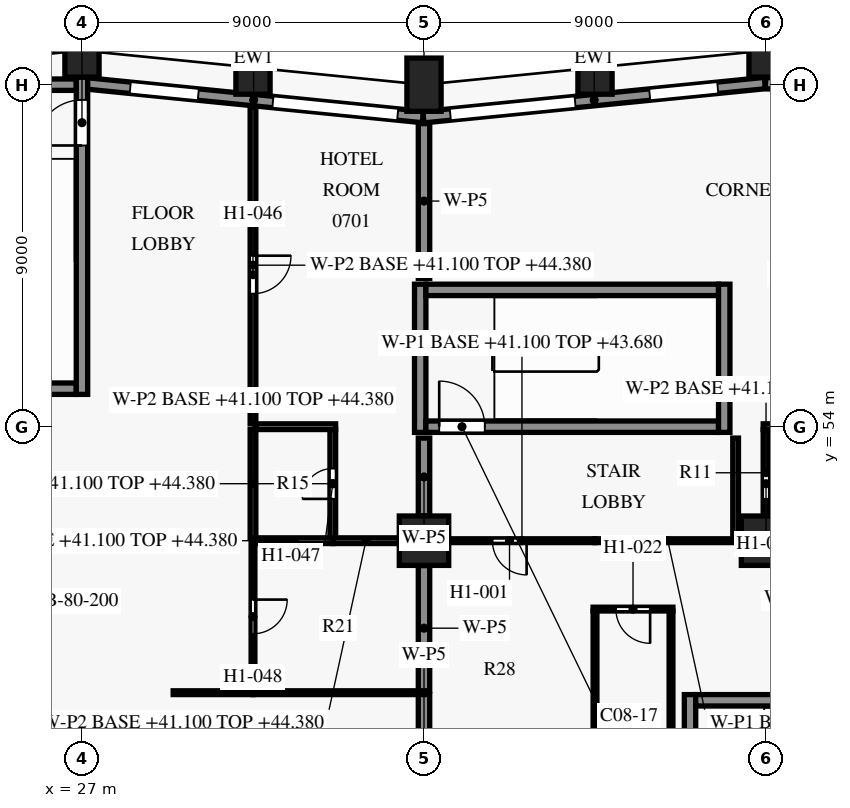
"""IFC4 building model, lengths in metres.
Left out: names, types, materials, properties, quantities, classifications, styles, units other than length and angle.
Written with IfcOpenShell. Run it as: python <this file> out.ifc"""

import sys

from ifc_helpers import new_model, si_unit, direction, frame, frame_2d, origin, origin_2d, place, context, subcontext, project, spatial, rectangle, extrude, element, fill, save


model = new_model("IFC4")
c1 = context("Model", 3, precision=1e-05, world=origin(), true_north=direction((0.0, 1.0)))
c2 = subcontext(c1, "Body", "Model", "MODEL_VIEW")
j1 = project(units=[si_unit("LENGTHUNIT", "METRE"), si_unit("PLANEANGLEUNIT", "RADIAN")], contexts=[c1])
p1 = place(None, origin())
s1 = spatial("IfcSite", under=j1, at=p1, CompositionType="ELEMENT")
p2 = place(p1, origin())
s2 = spatial("IfcBuilding", under=s1, at=p2, CompositionType="ELEMENT")
p3 = place(p2, frame((0.0, 0.0, 41.1)))
s3 = spatial("IfcBuildingStorey", under=s2, at=p3, CompositionType="ELEMENT", Elevation=41.1)
for number, where, z_axis, x_axis in (
    (1, (45.0, 63.9, 0.0), (0.0, 0.0, 1.0), (-1.0, 0.0, 0.0)),
    (2, (40.5, 63.45, 0.0), (0.0, 0.0, 1.0), (-0.995, -0.1, 0.0)),
    (3, (36.0, 63.0, 0.0), (0.0, 0.0, 1.0), (-1.0, 0.0, 0.0)),
    (4, (31.5, 63.45, 0.0), (0.0, 0.0, 1.0), (-0.995, 0.1, 0.0)),
    (5, (27.0, 63.9, 0.0), (0.0, 0.0, 1.0), (-1.0, 0.0, 0.0)),
):
    element("IfcColumn", number, at=place(p3, frame(where, z_axis=z_axis, x_axis=x_axis)), inside=s3, PredefinedType="COLUMN", context=c2, shape_type="SweptSolid", body=[
        extrude(rectangle(XDim=0.9, YDim=1.4, at=origin_2d()), origin(), (0.0, 0.0, 1.0), 3.6),
    ])
for number, where, z_axis, x_axis in (
    (6, (36.0, 51.0, 0.0), (0.0, 0.0, 1.0), (1.0, 0.0, 0.0)),
    (7, (45.0, 51.0, 0.0), (0.0, 0.0, 1.0), (1.0, 0.0, 0.0)),
):
    element("IfcColumn", number, at=place(p3, frame(where, z_axis=z_axis, x_axis=x_axis)), inside=s3, PredefinedType="COLUMN", context=c2, shape_type="SweptSolid", body=[
        extrude(rectangle(XDim=1.3, YDim=1.3, at=origin_2d()), origin(), (0.0, 0.0, 1.0), 3.6),
    ])
p4 = place(p3, frame((44.985, 63.047, 0.0), z_axis=(0.0, 0.0, 1.0), x_axis=(0.995035316196, -0.099522457379, 0.0)))
e8 = element("IfcWall", 8, at=p4, inside=s3, PredefinedType="SOLIDWALL", context=c2, shape_type="SweptSolid", body=[
    extrude(rectangle(XDim=9.03, YDim=0.3, at=frame_2d((4.515, 0.0))), origin(), (0.0, 0.0, 1.0), 2.95),
])
p5 = place(p4, frame((1.291, 0.0, 0.75)))
e9 = element("IfcOpeningElement", 9, at=p5, cuts=e8, PredefinedType="OPENING", context=c2, shape_type="SweptSolid", body=[
    extrude(rectangle(XDim=1.8, YDim=1.8, at=frame_2d((0.9, 0.9))), frame((0.0, 0.16, 0.0), z_axis=(0.0, -1.0, 0.0), x_axis=(1.0, 0.0, 0.0)), (0.0, 0.0, 1.0), 0.32),
])
p6 = place(p4, frame((5.064, 0.0, 0.15)))
e10 = element("IfcOpeningElement", 10, at=p6, cuts=e8, PredefinedType="OPENING", context=c2, shape_type="SweptSolid", body=[
    extrude(rectangle(XDim=3.3, YDim=2.4, at=frame_2d((1.65, 1.2))), frame((0.0, 0.16, 0.0), z_axis=(0.0, -1.0, 0.0), x_axis=(1.0, 0.0, 0.0)), (0.0, 0.0, 1.0), 0.32),
])
p7 = place(p3, frame((35.985, 62.144, 0.0), z_axis=(0.0, 0.0, 1.0), x_axis=(0.995037993253, 0.099495688264, 0.0)))
e11 = element("IfcWall", 11, at=p7, inside=s3, PredefinedType="SOLIDWALL", context=c2, shape_type="SweptSolid", body=[
    extrude(rectangle(XDim=9.03, YDim=0.3, at=frame_2d((4.515, 0.0))), origin(), (0.0, 0.0, 1.0), 2.95),
])
p8 = place(p7, frame((0.711, 0.0, 0.15)))
e12 = element("IfcOpeningElement", 12, at=p8, cuts=e11, PredefinedType="OPENING", context=c2, shape_type="SweptSolid", body=[
    extrude(rectangle(XDim=3.3, YDim=2.4, at=frame_2d((1.65, 1.2))), frame((0.0, 0.16, 0.0), z_axis=(0.0, -1.0, 0.0), x_axis=(1.0, 0.0, 0.0)), (0.0, 0.0, 1.0), 0.32),
])
p9 = place(p7, frame((5.984, 0.0, 0.75)))
e13 = element("IfcOpeningElement", 13, at=p9, cuts=e11, PredefinedType="OPENING", context=c2, shape_type="SweptSolid", body=[
    extrude(rectangle(XDim=1.8, YDim=1.8, at=frame_2d((0.9, 0.9))), frame((0.0, 0.16, 0.0), z_axis=(0.0, -1.0, 0.0), x_axis=(1.0, 0.0, 0.0)), (0.0, 0.0, 1.0), 0.32),
])
p10 = place(p3, frame((27.065, 63.039, 0.0), z_axis=(0.0, 0.0, 1.0), x_axis=(0.995036379926, -0.099511821531, 0.0)))
e14 = element("IfcWall", 14, at=p10, inside=s3, PredefinedType="SOLIDWALL", context=c2, shape_type="SweptSolid", body=[
    extrude(rectangle(XDim=8.95, YDim=0.3, at=frame_2d((4.475, 0.0))), origin(), (0.0, 0.0, 1.0), 2.95),
])
p11 = place(p10, frame((1.211, 0.0, 0.75)))
e15 = element("IfcOpeningElement", 15, at=p11, cuts=e14, PredefinedType="OPENING", context=c2, shape_type="SweptSolid", body=[
    extrude(rectangle(XDim=1.8, YDim=1.8, at=frame_2d((0.9, 0.9))), frame((0.0, 0.16, 0.0), z_axis=(0.0, -1.0, 0.0), x_axis=(1.0, 0.0, 0.0)), (0.0, 0.0, 1.0), 0.32),
])
p12 = place(p10, frame((4.984, 0.0, 0.15)))
e16 = element("IfcOpeningElement", 16, at=p12, cuts=e14, PredefinedType="OPENING", context=c2, shape_type="SweptSolid", body=[
    extrude(rectangle(XDim=3.3, YDim=2.4, at=frame_2d((1.65, 1.2))), frame((0.0, 0.16, 0.0), z_axis=(0.0, -1.0, 0.0), x_axis=(1.0, 0.0, 0.0)), (0.0, 0.0, 1.0), 0.32),
])
p13 = place(p3, frame((43.15, 46.8, 0.0), z_axis=(0.0, 0.0, 1.0), x_axis=(1.0, 0.0, 0.0)))
e17 = element("IfcWall", 17, at=p13, inside=s3, PredefinedType="SHEAR", context=c2, shape_type="SweptSolid", body=[
    extrude(rectangle(XDim=7.7, YDim=0.3, at=frame_2d((3.85, 0.0))), origin(), (0.0, 0.0, 1.0), 3.3),
])
p14 = place(p3, frame((36.05, 54.0, 0.0), z_axis=(0.0, 0.0, 1.0), x_axis=(1.0, 0.0, 0.0)))
e18 = element("IfcWall", 18, at=p14, inside=s3, PredefinedType="SHEAR", context=c2, shape_type="SweptSolid", body=[
    extrude(rectangle(XDim=7.7, YDim=0.3, at=frame_2d((3.85, 0.0))), origin(), (0.0, 0.0, 1.0), 3.3),
])
p15 = place(p14, frame((0.35, 0.0, 0.0)))
e19 = element("IfcOpeningElement", 19, at=p15, cuts=e18, PredefinedType="OPENING", context=c2, shape_type="SweptSolid", body=[
    extrude(rectangle(XDim=1.2, YDim=2.2, at=frame_2d((0.6, 1.1))), frame((0.0, 0.16, 0.0), z_axis=(0.0, -1.0, 0.0), x_axis=(1.0, 0.0, 0.0)), (0.0, 0.0, 1.0), 0.32),
])
p16 = place(p3, frame((23.4, 55.0, 0.0), z_axis=(0.0, 0.0, 1.0), x_axis=(1.0, 0.0, 0.0)))
e20 = element("IfcWall", 20, at=p16, inside=s3, PredefinedType="SHEAR", context=c2, shape_type="SweptSolid", body=[
    extrude(rectangle(XDim=3.45, YDim=0.3, at=frame_2d((1.725, 0.0))), origin(), (0.0, 0.0, 1.0), 3.3),
])
p17 = place(p3, frame((36.05, 57.6, 0.0), z_axis=(0.0, 0.0, 1.0), x_axis=(1.0, 0.0, 0.0)))
e21 = element("IfcWall", 21, at=p17, inside=s3, PredefinedType="SHEAR", context=c2, shape_type="SweptSolid", body=[
    extrude(rectangle(XDim=7.7, YDim=0.3, at=frame_2d((3.85, 0.0))), origin(), (0.0, 0.0, 1.0), 3.3),
])
p18 = place(p3, frame((23.55, 63.0, 0.0), z_axis=(0.0, 0.0, 1.0), x_axis=(1.0, 0.0, 0.0)))
e22 = element("IfcWall", 22, at=p18, inside=s3, PredefinedType="SHEAR", context=c2, shape_type="SweptSolid", body=[
    extrude(rectangle(XDim=3.3, YDim=0.3, at=frame_2d((1.65, 0.0))), origin(), (0.0, 0.0, 1.0), 3.3),
])
p19 = place(p3, frame((27.0, 54.85, 0.0), z_axis=(0.0, 0.0, 1.0), x_axis=(0.0, 1.0, 0.0)))
e23 = element("IfcWall", 23, at=p19, inside=s3, PredefinedType="SHEAR", context=c2, shape_type="SweptSolid", body=[
    extrude(rectangle(XDim=8.35, YDim=0.3, at=frame_2d((4.175, 0.0))), origin(), (0.0, 0.0, 1.0), 3.3),
])
p20 = place(p19, frame((6.55, 0.0, 0.0)))
e24 = element("IfcOpeningElement", 24, at=p20, cuts=e23, PredefinedType="OPENING", context=c2, shape_type="SweptSolid", body=[
    extrude(rectangle(XDim=1.2, YDim=2.2, at=frame_2d((0.6, 1.1))), frame((0.0, 0.16, 0.0), z_axis=(0.0, -1.0, 0.0), x_axis=(1.0, 0.0, 0.0)), (0.0, 0.0, 1.0), 0.32),
])
for number, where, z_axis, x_axis in (
    (25, (35.9, 53.85, 0.0), (0.0, 0.0, 1.0), (0.0, 1.0, 0.0)),
    (26, (43.0, 43.05, 0.0), (0.0, 0.0, 1.0), (0.0, 1.0, 0.0)),
    (27, (43.9, 53.85, 0.0), (0.0, 0.0, 1.0), (0.0, 1.0, 0.0)),
):
    element("IfcWall", number, at=place(p3, frame(where, z_axis=z_axis, x_axis=x_axis)), inside=s3, PredefinedType="SHEAR", context=c2, shape_type="SweptSolid", body=[
        extrude(rectangle(XDim=3.9, YDim=0.3, at=frame_2d((1.95, 0.0))), origin(), (0.0, 0.0, 1.0), 3.3),
    ])
p21 = place(p3, frame((36.0, 46.95, 0.0), z_axis=(0.0, 0.0, 1.0), x_axis=(0.0, -1.0, 0.0)))
e28 = element("IfcWall", 28, at=p21, inside=s3, PredefinedType="PARTITIONING", context=c2, shape_type="SweptSolid", body=[
    extrude(rectangle(XDim=3.7, YDim=0.3, at=frame_2d((1.85, 0.0))), origin(), (0.0, 0.0, 1.0), 2.58),
])
p22 = place(p21, frame((0.95, 0.0, 0.0)))
e29 = element("IfcOpeningElement", 29, at=p22, cuts=e28, PredefinedType="OPENING", context=c2, shape_type="SweptSolid", body=[
    extrude(rectangle(XDim=1.8, YDim=2.1, at=frame_2d((0.9, 1.05))), frame((0.0, 0.16, 0.0), z_axis=(0.0, -1.0, 0.0), x_axis=(1.0, 0.0, 0.0)), (0.0, 0.0, 1.0), 0.32),
])
p23 = place(p3, frame((29.4, 47.0, 0.0), z_axis=(0.0, 0.0, 1.0), x_axis=(1.0, 0.0, 0.0)))
e30 = element("IfcWall", 30, at=p23, inside=s3, PredefinedType="PARTITIONING", context=c2, shape_type="SweptSolid", body=[
    extrude(rectangle(XDim=2.1, YDim=0.1, at=frame_2d((1.05, 0.0))), origin(), (0.0, 0.0, 1.0), 3.28),
])
p24 = place(p3, frame((31.5, 47.0, 0.0), z_axis=(0.0, 0.0, 1.0), x_axis=(1.0, 0.0, 0.0)))
e31 = element("IfcWall", 31, at=p24, inside=s3, PredefinedType="PARTITIONING", context=c2, shape_type="SweptSolid", body=[
    extrude(rectangle(XDim=4.35, YDim=0.1, at=frame_2d((2.175, 0.0))), origin(), (0.0, 0.0, 1.0), 3.28),
])
for number, where, z_axis, x_axis in (
    (32, (40.5, 49.15, 0.0), (0.0, 0.0, 1.0), (0.0, -1.0, 0.0)),
    (33, (42.5, 49.15, 0.0), (0.0, 0.0, 1.0), (0.0, -1.0, 0.0)),
):
    element("IfcWall", number, at=place(p3, frame(where, z_axis=z_axis, x_axis=x_axis)), inside=s3, PredefinedType="PARTITIONING", context=c2, shape_type="SweptSolid", body=[
        extrude(rectangle(XDim=8.3, YDim=0.1, at=frame_2d((4.15, 0.0))), origin(), (0.0, 0.0, 1.0), 3.28),
    ])
p25 = place(p3, frame((42.55, 49.2, 0.0), z_axis=(0.0, 0.0, 1.0), x_axis=(-1.0, 0.0, 0.0)))
e34 = element("IfcWall", 34, at=p25, inside=s3, PredefinedType="PARTITIONING", context=c2, shape_type="SweptSolid", body=[
    extrude(rectangle(XDim=2.1, YDim=0.1, at=frame_2d((1.05, 0.0))), origin(), (0.0, 0.0, 1.0), 3.28),
])
p26 = place(p25, frame((0.6, 0.0, 0.0)))
e35 = element("IfcOpeningElement", 35, at=p26, cuts=e34, PredefinedType="OPENING", context=c2, shape_type="SweptSolid", body=[
    extrude(rectangle(XDim=0.9, YDim=2.1, at=frame_2d((0.45, 1.05))), frame((0.0, 0.06, 0.0), z_axis=(0.0, -1.0, 0.0), x_axis=(1.0, 0.0, 0.0)), (0.0, 0.0, 1.0), 0.12),
])
p27 = place(p3, frame((36.0, 50.345, 0.0), z_axis=(0.0, 0.0, 1.0), x_axis=(0.0, -1.0, 0.0)))
e36 = element("IfcWall", 36, at=p27, inside=s3, PredefinedType="PARTITIONING", context=c2, shape_type="SweptSolid", body=[
    extrude(rectangle(XDim=3.295, YDim=0.3, at=frame_2d((1.647, 0.0))), origin(), (0.0, 0.0, 1.0), 2.58),
])
p28 = place(p3, frame((31.5, 50.925, 0.0), z_axis=(0.0, 0.0, 1.0), x_axis=(0.0, -1.0, 0.0)))
e37 = element("IfcWall", 37, at=p28, inside=s3, PredefinedType="PARTITIONING", context=c2, shape_type="SweptSolid", body=[
    extrude(rectangle(XDim=3.875, YDim=0.1, at=frame_2d((1.938, 0.0))), origin(), (0.0, 0.0, 1.0), 3.28),
])
p29 = place(p28, frame((1.475, 0.0, 0.0)))
e38 = element("IfcOpeningElement", 38, at=p29, cuts=e37, PredefinedType="OPENING", context=c2, shape_type="SweptSolid", body=[
    extrude(rectangle(XDim=0.9, YDim=2.1, at=frame_2d((0.45, 1.05))), frame((0.0, 0.06, 0.0), z_axis=(0.0, -1.0, 0.0), x_axis=(1.0, 0.0, 0.0)), (0.0, 0.0, 1.0), 0.12),
])
p30 = place(p3, frame((31.575, 51.0, 0.0), z_axis=(0.0, 0.0, 1.0), x_axis=(1.0, 0.0, 0.0)))
e39 = element("IfcWall", 39, at=p30, inside=s3, PredefinedType="PARTITIONING", context=c2, shape_type="SweptSolid", body=[
    extrude(rectangle(XDim=2.025, YDim=0.15, at=frame_2d((1.013, 0.0))), origin(), (0.0, 0.0, 1.0), 3.28),
])
p31 = place(p3, frame((33.6, 51.0, 0.0), z_axis=(0.0, 0.0, 1.0), x_axis=(1.0, 0.0, 0.0)))
e40 = element("IfcWall", 40, at=p31, inside=s3, PredefinedType="PARTITIONING", context=c2, shape_type="SweptSolid", body=[
    extrude(rectangle(XDim=1.745, YDim=0.15, at=frame_2d((0.873, 0.0))), origin(), (0.0, 0.0, 1.0), 3.28),
])
p32 = place(p3, frame((40.5, 51.0, 0.0), z_axis=(0.0, 0.0, 1.0), x_axis=(-1.0, 0.0, 0.0)))
e41 = element("IfcWall", 41, at=p32, inside=s3, PredefinedType="PARTITIONING", context=c2, shape_type="SweptSolid", body=[
    extrude(rectangle(XDim=3.845, YDim=0.1, at=frame_2d((1.922, 0.0))), origin(), (0.0, 0.0, 1.0), 2.58),
])
p33 = place(p32, frame((1.8, 0.0, 0.0)))
e42 = element("IfcOpeningElement", 42, at=p33, cuts=e41, PredefinedType="OPENING", context=c2, shape_type="SweptSolid", body=[
    extrude(rectangle(XDim=0.9, YDim=2.1, at=frame_2d((0.45, 1.05))), frame((0.0, 0.06, 0.0), z_axis=(0.0, -1.0, 0.0), x_axis=(1.0, 0.0, 0.0)), (0.0, 0.0, 1.0), 0.12),
])
p34 = place(p3, frame((44.33, 51.0, 0.0), z_axis=(0.0, 0.0, 1.0), x_axis=(-1.0, 0.0, 0.0)))
e43 = element("IfcWall", 43, at=p34, inside=s3, PredefinedType="PARTITIONING", context=c2, shape_type="SweptSolid", body=[
    extrude(rectangle(XDim=3.83, YDim=0.1, at=frame_2d((1.915, 0.0))), origin(), (0.0, 0.0, 1.0), 2.58),
])
p35 = place(p3, frame((33.6, 51.075, 0.0), z_axis=(0.0, 0.0, 1.0), x_axis=(0.0, 1.0, 0.0)))
e44 = element("IfcWall", 44, at=p35, inside=s3, PredefinedType="PARTITIONING", context=c2, shape_type="SweptSolid", body=[
    extrude(rectangle(XDim=2.85, YDim=0.15, at=frame_2d((1.425, 0.0))), origin(), (0.0, 0.0, 1.0), 3.28),
])
p36 = place(p35, frame((1.025, 0.0, 0.0)))
e45 = element("IfcOpeningElement", 45, at=p36, cuts=e44, PredefinedType="OPENING", context=c2, shape_type="SweptSolid", body=[
    extrude(rectangle(XDim=0.8, YDim=2.1, at=frame_2d((0.4, 1.05))), frame((0.0, 0.085, 0.0), z_axis=(0.0, -1.0, 0.0), x_axis=(1.0, 0.0, 0.0)), (0.0, 0.0, 1.0), 0.17),
])
p37 = place(p3, frame((36.0, 53.7, 0.0), z_axis=(0.0, 0.0, 1.0), x_axis=(0.0, -1.0, 0.0)))
e46 = element("IfcWall", 46, at=p37, inside=s3, PredefinedType="PARTITIONING", context=c2, shape_type="SweptSolid", body=[
    extrude(rectangle(XDim=2.045, YDim=0.3, at=frame_2d((1.022, 0.0))), origin(), (0.0, 0.0, 1.0), 2.58),
])
p38 = place(p3, frame((44.2, 53.7, 0.0), z_axis=(0.0, 0.0, 1.0), x_axis=(0.0, -1.0, 0.0)))
e47 = element("IfcWall", 47, at=p38, inside=s3, PredefinedType="PARTITIONING", context=c2, shape_type="SweptSolid", body=[
    extrude(rectangle(XDim=2.625, YDim=0.15, at=frame_2d((1.312, 0.0))), origin(), (0.0, 0.0, 1.0), 2.58),
])
p39 = place(p3, frame((31.5, 53.925, 0.0), z_axis=(0.0, 0.0, 1.0), x_axis=(0.0, -1.0, 0.0)))
e48 = element("IfcWall", 48, at=p39, inside=s3, PredefinedType="PARTITIONING", context=c2, shape_type="SweptSolid", body=[
    extrude(rectangle(XDim=2.85, YDim=0.15, at=frame_2d((1.425, 0.0))), origin(), (0.0, 0.0, 1.0), 3.28),
])
p40 = place(p3, frame((45.0, 53.925, 0.0), z_axis=(0.0, 0.0, 1.0), x_axis=(0.0, -1.0, 0.0)))
e49 = element("IfcWall", 49, at=p40, inside=s3, PredefinedType="PARTITIONING", context=c2, shape_type="SweptSolid", body=[
    extrude(rectangle(XDim=2.27, YDim=0.15, at=frame_2d((1.135, 0.0))), origin(), (0.0, 0.0, 1.0), 2.73),
])
p41 = place(p40, frame((1.025, 0.0, 0.0)))
e50 = element("IfcOpeningElement", 50, at=p41, cuts=e49, PredefinedType="OPENING", context=c2, shape_type="SweptSolid", body=[
    extrude(rectangle(XDim=0.8, YDim=2.1, at=frame_2d((0.4, 1.05))), frame((0.0, 0.085, 0.0), z_axis=(0.0, -1.0, 0.0), x_axis=(1.0, 0.0, 0.0)), (0.0, 0.0, 1.0), 0.17),
])
p42 = place(p3, frame((33.675, 54.0, 0.0), z_axis=(0.0, 0.0, 1.0), x_axis=(-1.0, 0.0, 0.0)))
e51 = element("IfcWall", 51, at=p42, inside=s3, PredefinedType="PARTITIONING", context=c2, shape_type="SweptSolid", body=[
    extrude(rectangle(XDim=2.1, YDim=0.15, at=frame_2d((1.05, 0.0))), origin(), (0.0, 0.0, 1.0), 3.28),
])
p43 = place(p3, frame((47.175, 54.0, 0.0), z_axis=(0.0, 0.0, 1.0), x_axis=(-1.0, 0.0, 0.0)))
e52 = element("IfcWall", 52, at=p43, inside=s3, PredefinedType="PARTITIONING", context=c2, shape_type="SweptSolid", body=[
    extrude(rectangle(XDim=2.25, YDim=0.15, at=frame_2d((1.125, 0.0))), origin(), (0.0, 0.0, 1.0), 2.73),
])
p44 = place(p3, frame((36.0, 61.975, 0.0), z_axis=(0.0, 0.0, 1.0), x_axis=(0.0, -1.0, 0.0)))
e53 = element("IfcWall", 53, at=p44, inside=s3, PredefinedType="PARTITIONING", context=c2, shape_type="SweptSolid", body=[
    extrude(rectangle(XDim=4.075, YDim=0.3, at=frame_2d((2.038, 0.0))), origin(), (0.0, 0.0, 1.0), 2.58),
])
p45 = place(p3, frame((31.5, 62.425, 0.0), z_axis=(0.0, 0.0, 1.0), x_axis=(0.0, -1.0, 0.0)))
e54 = element("IfcWall", 54, at=p45, inside=s3, PredefinedType="PARTITIONING", context=c2, shape_type="SweptSolid", body=[
    extrude(rectangle(XDim=8.35, YDim=0.15, at=frame_2d((4.175, 0.0))), origin(), (0.0, 0.0, 1.0), 3.28),
])
p46 = place(p45, frame((3.925, 0.0, 0.0)))
e55 = element("IfcOpeningElement", 55, at=p46, cuts=e54, PredefinedType="OPENING", context=c2, shape_type="SweptSolid", body=[
    extrude(rectangle(XDim=1.0, YDim=2.1, at=frame_2d((0.5, 1.05))), frame((0.0, 0.085, 0.0), z_axis=(0.0, -1.0, 0.0), x_axis=(1.0, 0.0, 0.0)), (0.0, 0.0, 1.0), 0.17),
])
p47 = place(p8, origin())
e56 = element("IfcWindow", 56, at=p47, inside=s3, PartitioningType="SINGLE_PANEL", PredefinedType="WINDOW", context=c2, shape_type="SweptSolid", body=[
    extrude(rectangle(XDim=3.3, YDim=2.4, at=frame_2d((1.65, 1.2))), frame((0.0, 0.03, 0.0), z_axis=(0.0, -1.0, 0.0), x_axis=(1.0, 0.0, 0.0)), (0.0, 0.0, 1.0), 0.06),
])
fill(e12, e56)
p48 = place(p9, origin())
e57 = element("IfcWindow", 57, at=p48, inside=s3, PartitioningType="SINGLE_PANEL", PredefinedType="WINDOW", context=c2, shape_type="SweptSolid", body=[
    extrude(rectangle(XDim=1.8, YDim=1.8, at=frame_2d((0.9, 0.9))), frame((0.0, 0.03, 0.0), z_axis=(0.0, -1.0, 0.0), x_axis=(1.0, 0.0, 0.0)), (0.0, 0.0, 1.0), 0.06),
])
fill(e13, e57)
p49 = place(p11, origin())
e58 = element("IfcWindow", 58, at=p49, inside=s3, PartitioningType="SINGLE_PANEL", PredefinedType="WINDOW", context=c2, shape_type="SweptSolid", body=[
    extrude(rectangle(XDim=1.8, YDim=1.8, at=frame_2d((0.9, 0.9))), frame((0.0, 0.03, 0.0), z_axis=(0.0, -1.0, 0.0), x_axis=(1.0, 0.0, 0.0)), (0.0, 0.0, 1.0), 0.06),
])
fill(e15, e58)
p50 = place(p12, origin())
e59 = element("IfcWindow", 59, at=p50, inside=s3, PartitioningType="SINGLE_PANEL", PredefinedType="WINDOW", context=c2, shape_type="SweptSolid", body=[
    extrude(rectangle(XDim=3.3, YDim=2.4, at=frame_2d((1.65, 1.2))), frame((0.0, 0.03, 0.0), z_axis=(0.0, -1.0, 0.0), x_axis=(1.0, 0.0, 0.0)), (0.0, 0.0, 1.0), 0.06),
])
fill(e16, e59)
p51 = place(p20, origin())
e60 = element("IfcDoor", 60, at=p51, inside=s3, OperationType="SINGLE_SWING_LEFT", PredefinedType="DOOR", context=c2, shape_type="SweptSolid", body=[
    extrude(rectangle(XDim=1.2, YDim=2.2, at=frame_2d((0.6, 1.1))), frame((0.0, 0.025, 0.0), z_axis=(0.0, -1.0, 0.0), x_axis=(1.0, 0.0, 0.0)), (0.0, 0.0, 1.0), 0.05),
])
fill(e24, e60)
p52 = place(p15, origin())
e61 = element("IfcDoor", 61, at=p52, inside=s3, OperationType="SINGLE_SWING_LEFT", PredefinedType="DOOR", context=c2, shape_type="SweptSolid", body=[
    extrude(rectangle(XDim=1.2, YDim=2.2, at=frame_2d((0.6, 1.1))), frame((0.0, 0.025, 0.0), z_axis=(0.0, -1.0, 0.0), x_axis=(1.0, 0.0, 0.0)), (0.0, 0.0, 1.0), 0.05),
])
fill(e19, e61)
p53 = place(p33, origin())
e62 = element("IfcDoor", 62, at=p53, inside=s3, OperationType="SINGLE_SWING_LEFT", PredefinedType="DOOR", context=c2, shape_type="SweptSolid", body=[
    extrude(rectangle(XDim=0.9, YDim=2.1, at=frame_2d((0.45, 1.05))), frame((0.0, 0.025, 0.0), z_axis=(0.0, -1.0, 0.0), x_axis=(1.0, 0.0, 0.0)), (0.0, 0.0, 1.0), 0.05),
])
fill(e42, e62)
p54 = place(p41, origin())
e63 = element("IfcDoor", 63, at=p54, inside=s3, OperationType="SINGLE_SWING_RIGHT", PredefinedType="DOOR", context=c2, shape_type="SweptSolid", body=[
    extrude(rectangle(XDim=0.8, YDim=2.1, at=frame_2d((0.4, 1.05))), frame((0.0, 0.025, 0.0), z_axis=(0.0, -1.0, 0.0), x_axis=(1.0, 0.0, 0.0)), (0.0, 0.0, 1.0), 0.05),
])
fill(e50, e63)
p55 = place(p26, origin())
e64 = element("IfcDoor", 64, at=p55, inside=s3, OperationType="SINGLE_SWING_LEFT", PredefinedType="DOOR", context=c2, shape_type="SweptSolid", body=[
    extrude(rectangle(XDim=0.9, YDim=2.1, at=frame_2d((0.45, 1.05))), frame((0.0, 0.025, 0.0), z_axis=(0.0, -1.0, 0.0), x_axis=(1.0, 0.0, 0.0)), (0.0, 0.0, 1.0), 0.05),
])
fill(e35, e64)
p56 = place(p46, origin())
e65 = element("IfcDoor", 65, at=p56, inside=s3, OperationType="SINGLE_SWING_LEFT", PredefinedType="DOOR", context=c2, shape_type="SweptSolid", body=[
    extrude(rectangle(XDim=1.0, YDim=2.1, at=frame_2d((0.5, 1.05))), frame((0.0, 0.025, 0.0), z_axis=(0.0, -1.0, 0.0), x_axis=(1.0, 0.0, 0.0)), (0.0, 0.0, 1.0), 0.05),
])
fill(e55, e65)
p57 = place(p36, origin())
e66 = element("IfcDoor", 66, at=p57, inside=s3, OperationType="SINGLE_SWING_LEFT", PredefinedType="DOOR", context=c2, shape_type="SweptSolid", body=[
    extrude(rectangle(XDim=0.8, YDim=2.1, at=frame_2d((0.4, 1.05))), frame((0.0, 0.025, 0.0), z_axis=(0.0, -1.0, 0.0), x_axis=(1.0, 0.0, 0.0)), (0.0, 0.0, 1.0), 0.05),
])
fill(e45, e66)
p58 = place(p29, origin())
e67 = element("IfcDoor", 67, at=p58, inside=s3, OperationType="SINGLE_SWING_LEFT", PredefinedType="DOOR", context=c2, shape_type="SweptSolid", body=[
    extrude(rectangle(XDim=0.9, YDim=2.1, at=frame_2d((0.45, 1.05))), frame((0.0, 0.025, 0.0), z_axis=(0.0, -1.0, 0.0), x_axis=(1.0, 0.0, 0.0)), (0.0, 0.0, 1.0), 0.05),
])
fill(e38, e67)
save(model, sys.argv[1])
